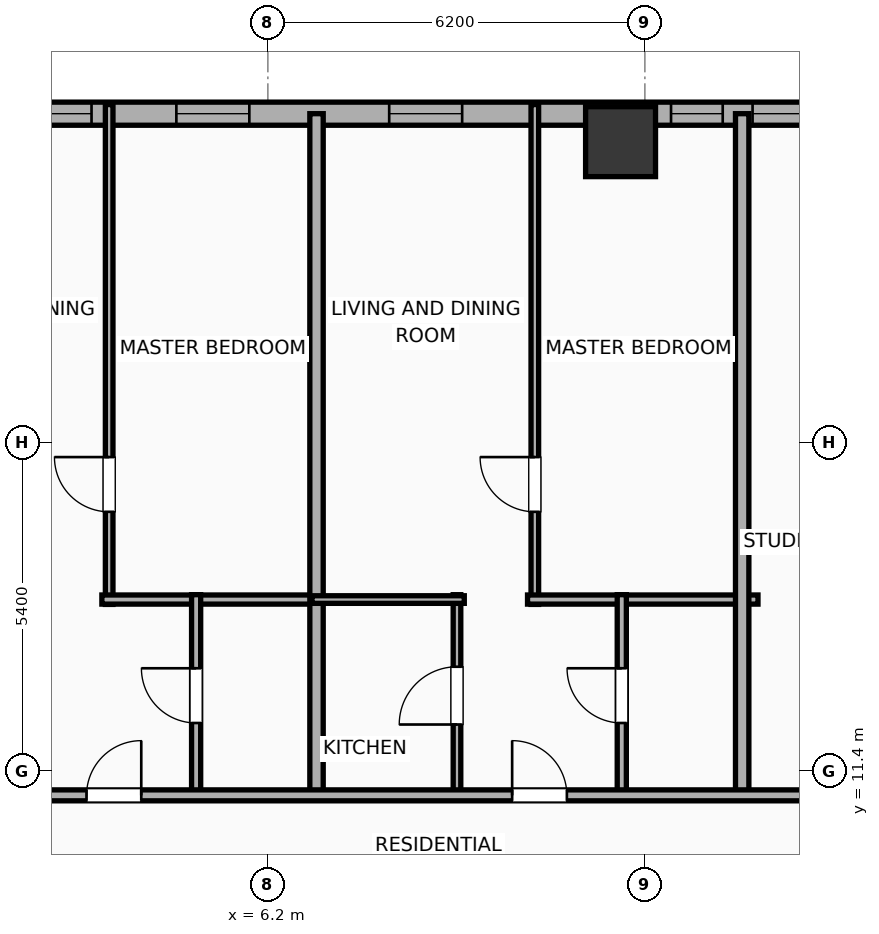
"""IFC4 building model, lengths in metres.
Left out: names, types, materials, properties, quantities, classifications, styles, units other than length and angle.
Written with IfcOpenShell. Run it as: python <this file> out.ifc"""

import sys

from ifc_helpers import new_model, si_unit, direction, frame, frame_2d, origin, origin_2d, place, context, subcontext, project, spatial, rectangle, hollow_rectangle, extrude, element, fill, save


model = new_model("IFC4")
c1 = context("Model", 3, precision=1e-05, world=origin(), true_north=direction((0.0, 1.0)))
c2 = subcontext(c1, "Body", "Model", "MODEL_VIEW")
j1 = project(units=[si_unit("LENGTHUNIT", "METRE"), si_unit("PLANEANGLEUNIT", "RADIAN")], contexts=[c1])
p1 = place(None, origin())
s1 = spatial("IfcSite", under=j1, at=p1, CompositionType="ELEMENT")
p2 = place(p1, origin())
s2 = spatial("IfcBuilding", under=s1, at=p2, CompositionType="ELEMENT")
p3 = place(p2, frame((0.0, 0.0, 65.0)))
s3 = spatial("IfcBuildingStorey", under=s2, at=p3, CompositionType="ELEMENT", Elevation=65.0)
p4 = place(p3, frame((12.0, 21.75, 0.0), z_axis=(0.0, 0.0, 1.0), x_axis=(1.0, 0.0, 0.0)))
e1 = element("IfcColumn", 1, at=p4, inside=s3, PredefinedType="COLUMN", context=c2, shape_type="SweptSolid", body=[
    extrude(hollow_rectangle(XDim=1.15, YDim=1.15, WallThickness=0.04, at=origin_2d()), origin(), (0.0, 0.0, 1.0), 3.9),
])
p5 = place(p3, frame((-29.581, 22.21, 0.0), z_axis=(0.0, 0.0, 1.0), x_axis=(1.0, 0.0, 0.0)))
e2 = element("IfcWall", 2, at=p5, inside=s3, PredefinedType="ELEMENTEDWALL", context=c2, shape_type="SweptSolid", body=[
    extrude(rectangle(XDim=51.963, YDim=0.38, at=frame_2d((25.981, 0.0))), origin(), (0.0, 0.0, 1.0), 3.65),
])
p6 = place(p5, frame((5.81, 0.0, 0.75)))
e3 = element("IfcOpeningElement", 3, at=p6, cuts=e2, PredefinedType="OPENING", context=c2, shape_type="SweptSolid", body=[
    extrude(rectangle(XDim=2.4, YDim=2.1, at=frame_2d((1.2, 1.05))), frame((0.0, 0.2, 0.0), z_axis=(0.0, -1.0, 0.0), x_axis=(1.0, 0.0, 0.0)), (0.0, 0.0, 1.0), 0.4),
])
p7 = place(p5, frame((26.431, 0.0, 0.75)))
e4 = element("IfcOpeningElement", 4, at=p7, cuts=e2, PredefinedType="OPENING", context=c2, shape_type="SweptSolid", body=[
    extrude(rectangle(XDim=2.4, YDim=2.1, at=frame_2d((1.2, 1.05))), frame((0.0, 0.2, 0.0), z_axis=(0.0, -1.0, 0.0), x_axis=(1.0, 0.0, 0.0)), (0.0, 0.0, 1.0), 0.4),
])
p8 = place(p5, frame((43.752, 0.0, 0.75)))
e5 = element("IfcOpeningElement", 5, at=p8, cuts=e2, PredefinedType="OPENING", context=c2, shape_type="SweptSolid", body=[
    extrude(rectangle(XDim=2.4, YDim=2.1, at=frame_2d((1.2, 1.05))), frame((0.0, 0.2, 0.0), z_axis=(0.0, -1.0, 0.0), x_axis=(1.0, 0.0, 0.0)), (0.0, 0.0, 1.0), 0.4),
])
p9 = place(p5, frame((1.163, 0.0, 0.75)))
e6 = element("IfcOpeningElement", 6, at=p9, cuts=e2, PredefinedType="OPENING", context=c2, shape_type="SweptSolid", body=[
    extrude(rectangle(XDim=1.2, YDim=2.05, at=frame_2d((0.6, 1.025))), frame((0.0, 0.2, 0.0), z_axis=(0.0, -1.0, 0.0), x_axis=(1.0, 0.0, 0.0)), (0.0, 0.0, 1.0), 0.4),
])
p10 = place(p5, frame((3.251, 0.0, 0.75)))
e7 = element("IfcOpeningElement", 7, at=p10, cuts=e2, PredefinedType="OPENING", context=c2, shape_type="SweptSolid", body=[
    extrude(rectangle(XDim=1.2, YDim=2.05, at=frame_2d((0.6, 1.025))), frame((0.0, 0.2, 0.0), z_axis=(0.0, -1.0, 0.0), x_axis=(1.0, 0.0, 0.0)), (0.0, 0.0, 1.0), 0.4),
])
p11 = place(p5, frame((11.745, 0.0, 0.75)))
e8 = element("IfcOpeningElement", 8, at=p11, cuts=e2, PredefinedType="OPENING", context=c2, shape_type="SweptSolid", body=[
    extrude(rectangle(XDim=1.2, YDim=2.05, at=frame_2d((0.6, 1.025))), frame((0.0, 0.2, 0.0), z_axis=(0.0, -1.0, 0.0), x_axis=(1.0, 0.0, 0.0)), (0.0, 0.0, 1.0), 0.4),
])
p12 = place(p5, frame((16.776, 0.0, 0.75)))
e9 = element("IfcOpeningElement", 9, at=p12, cuts=e2, PredefinedType="OPENING", context=c2, shape_type="SweptSolid", body=[
    extrude(rectangle(XDim=1.2, YDim=2.05, at=frame_2d((0.6, 1.025))), frame((0.0, 0.2, 0.0), z_axis=(0.0, -1.0, 0.0), x_axis=(1.0, 0.0, 0.0)), (0.0, 0.0, 1.0), 0.4),
])
p13 = place(p5, frame((21.531, 0.0, 0.75)))
e10 = element("IfcOpeningElement", 10, at=p13, cuts=e2, PredefinedType="OPENING", context=c2, shape_type="SweptSolid", body=[
    extrude(rectangle(XDim=0.85, YDim=2.05, at=frame_2d((0.425, 1.025))), frame((0.0, 0.2, 0.0), z_axis=(0.0, -1.0, 0.0), x_axis=(1.0, 0.0, 0.0)), (0.0, 0.0, 1.0), 0.4),
])
p14 = place(p5, frame((23.776, 0.0, 0.75)))
e11 = element("IfcOpeningElement", 11, at=p14, cuts=e2, PredefinedType="OPENING", context=c2, shape_type="SweptSolid", body=[
    extrude(rectangle(XDim=1.2, YDim=2.05, at=frame_2d((0.6, 1.025))), frame((0.0, 0.2, 0.0), z_axis=(0.0, -1.0, 0.0), x_axis=(1.0, 0.0, 0.0)), (0.0, 0.0, 1.0), 0.4),
])
p15 = place(p5, frame((32.031, 0.0, 0.75)))
e12 = element("IfcOpeningElement", 12, at=p15, cuts=e2, PredefinedType="OPENING", context=c2, shape_type="SweptSolid", body=[
    extrude(rectangle(XDim=0.85, YDim=2.05, at=frame_2d((0.425, 1.025))), frame((0.0, 0.2, 0.0), z_axis=(0.0, -1.0, 0.0), x_axis=(1.0, 0.0, 0.0)), (0.0, 0.0, 1.0), 0.4),
])
p16 = place(p5, frame((34.276, 0.0, 0.75)))
e13 = element("IfcOpeningElement", 13, at=p16, cuts=e2, PredefinedType="OPENING", context=c2, shape_type="SweptSolid", body=[
    extrude(rectangle(XDim=1.2, YDim=2.05, at=frame_2d((0.6, 1.025))), frame((0.0, 0.2, 0.0), z_axis=(0.0, -1.0, 0.0), x_axis=(1.0, 0.0, 0.0)), (0.0, 0.0, 1.0), 0.4),
])
p17 = place(p5, frame((37.776, 0.0, 0.75)))
e14 = element("IfcOpeningElement", 14, at=p17, cuts=e2, PredefinedType="OPENING", context=c2, shape_type="SweptSolid", body=[
    extrude(rectangle(XDim=1.2, YDim=2.05, at=frame_2d((0.6, 1.025))), frame((0.0, 0.2, 0.0), z_axis=(0.0, -1.0, 0.0), x_axis=(1.0, 0.0, 0.0)), (0.0, 0.0, 1.0), 0.4),
])
p18 = place(p5, frame((42.411, 0.0, 0.75)))
e15 = element("IfcOpeningElement", 15, at=p18, cuts=e2, PredefinedType="OPENING", context=c2, shape_type="SweptSolid", body=[
    extrude(rectangle(XDim=0.85, YDim=2.05, at=frame_2d((0.425, 1.025))), frame((0.0, 0.2, 0.0), z_axis=(0.0, -1.0, 0.0), x_axis=(1.0, 0.0, 0.0)), (0.0, 0.0, 1.0), 0.4),
])
p19 = place(p5, frame((47.791, 0.0, 0.75)))
e16 = element("IfcOpeningElement", 16, at=p19, cuts=e2, PredefinedType="OPENING", context=c2, shape_type="SweptSolid", body=[
    extrude(rectangle(XDim=1.2, YDim=2.05, at=frame_2d((0.6, 1.025))), frame((0.0, 0.2, 0.0), z_axis=(0.0, -1.0, 0.0), x_axis=(1.0, 0.0, 0.0)), (0.0, 0.0, 1.0), 0.4),
])
p20 = place(p5, frame((49.901, 0.0, 0.75)))
e17 = element("IfcOpeningElement", 17, at=p20, cuts=e2, PredefinedType="OPENING", context=c2, shape_type="SweptSolid", body=[
    extrude(rectangle(XDim=1.2, YDim=2.05, at=frame_2d((0.6, 1.025))), frame((0.0, 0.2, 0.0), z_axis=(0.0, -1.0, 0.0), x_axis=(1.0, 0.0, 0.0)), (0.0, 0.0, 1.0), 0.4),
])
p21 = place(p3, frame((3.59, 14.14, 0.0), z_axis=(0.0, 0.0, 1.0), x_axis=(0.0, 1.0, 0.0)))
e18 = element("IfcWall", 18, at=p21, inside=s3, PredefinedType="PARTITIONING", context=c2, shape_type="SweptSolid", body=[
    extrude(rectangle(XDim=8.22, YDim=0.125, at=frame_2d((4.11, 0.0))), origin(), (0.0, 0.0, 1.0), 3.65),
])
p22 = place(p21, frame((1.523, 0.0, 0.0)))
e19 = element("IfcOpeningElement", 19, at=p22, cuts=e18, PredefinedType="OPENING", context=c2, shape_type="SweptSolid", body=[
    extrude(rectangle(XDim=0.9, YDim=2.05, at=frame_2d((0.45, 1.025))), frame((0.0, 0.073, 0.0), z_axis=(0.0, -1.0, 0.0), x_axis=(1.0, 0.0, 0.0)), (0.0, 0.0, 1.0), 0.145),
])
p23 = place(p3, frame((3.47, 14.22, 0.0), z_axis=(0.0, 0.0, 1.0), x_axis=(1.0, 0.0, 0.0)))
e20 = element("IfcWall", 20, at=p23, inside=s3, PredefinedType="PLUMBINGWALL", context=c2, shape_type="SweptSolid", body=[
    extrude(rectangle(XDim=3.605, YDim=0.15, at=frame_2d((1.802, 0.0))), origin(), (0.0, 0.0, 1.0), 3.65),
])
p24 = place(p3, frame((5.02, 10.98, 0.0), z_axis=(0.0, 0.0, 1.0), x_axis=(0.0, 1.0, 0.0)))
e21 = element("IfcWall", 21, at=p24, inside=s3, PredefinedType="PLUMBINGWALL", context=c2, shape_type="SweptSolid", body=[
    extrude(rectangle(XDim=3.32, YDim=0.15, at=frame_2d((1.66, 0.0))), origin(), (0.0, 0.0, 1.0), 3.65),
])
p25 = place(p24, frame((1.21, 0.0, 0.0)))
e22 = element("IfcOpeningElement", 22, at=p25, cuts=e21, PredefinedType="OPENING", context=c2, shape_type="SweptSolid", body=[
    extrude(rectangle(XDim=0.9, YDim=2.05, at=frame_2d((0.45, 1.025))), frame((0.0, 0.085, 0.0), z_axis=(0.0, -1.0, 0.0), x_axis=(1.0, 0.0, 0.0)), (0.0, 0.0, 1.0), 0.17),
])
p26 = place(p3, frame((7.0, 10.92, 0.0), z_axis=(0.0, 0.0, 1.0), x_axis=(0.0, 1.0, 0.0)))
e23 = element("IfcWall", 23, at=p26, inside=s3, PredefinedType="PARTITIONING", context=c2, shape_type="SweptSolid", body=[
    extrude(rectangle(XDim=11.29, YDim=0.22, at=frame_2d((5.645, 0.0))), origin(), (0.0, 0.0, 1.0), 3.65),
])
p27 = place(p3, frame((10.59, 14.14, 0.0), z_axis=(0.0, 0.0, 1.0), x_axis=(0.0, 1.0, 0.0)))
e24 = element("IfcWall", 24, at=p27, inside=s3, PredefinedType="PARTITIONING", context=c2, shape_type="SweptSolid", body=[
    extrude(rectangle(XDim=8.22, YDim=0.125, at=frame_2d((4.11, 0.0))), origin(), (0.0, 0.0, 1.0), 3.65),
])
p28 = place(p27, frame((1.523, 0.0, 0.0)))
e25 = element("IfcOpeningElement", 25, at=p28, cuts=e24, PredefinedType="OPENING", context=c2, shape_type="SweptSolid", body=[
    extrude(rectangle(XDim=0.9, YDim=2.05, at=frame_2d((0.45, 1.025))), frame((0.0, 0.073, 0.0), z_axis=(0.0, -1.0, 0.0), x_axis=(1.0, 0.0, 0.0)), (0.0, 0.0, 1.0), 0.145),
])
p29 = place(p3, frame((10.47, 14.22, 0.0), z_axis=(0.0, 0.0, 1.0), x_axis=(1.0, 0.0, 0.0)))
e26 = element("IfcWall", 26, at=p29, inside=s3, PredefinedType="PLUMBINGWALL", context=c2, shape_type="SweptSolid", body=[
    extrude(rectangle(XDim=3.79, YDim=0.15, at=frame_2d((1.895, 0.0))), origin(), (0.0, 0.0, 1.0), 3.65),
])
p30 = place(p3, frame((9.31, 10.98, 0.0), z_axis=(0.0, 0.0, 1.0), x_axis=(0.0, 1.0, 0.0)))
e27 = element("IfcWall", 27, at=p30, inside=s3, PredefinedType="PARTITIONING", context=c2, shape_type="SweptSolid", body=[
    extrude(rectangle(XDim=3.32, YDim=0.125, at=frame_2d((1.66, 0.0))), origin(), (0.0, 0.0, 1.0), 3.65),
])
p31 = place(p30, frame((1.185, 0.0, 0.0)))
e28 = element("IfcOpeningElement", 28, at=p31, cuts=e27, PredefinedType="OPENING", context=c2, shape_type="SweptSolid", body=[
    extrude(rectangle(XDim=0.95, YDim=2.05, at=frame_2d((0.475, 1.025))), frame((0.0, 0.073, 0.0), z_axis=(0.0, -1.0, 0.0), x_axis=(1.0, 0.0, 0.0)), (0.0, 0.0, 1.0), 0.145),
])
p32 = place(p3, frame((6.925, 14.22, 0.0), z_axis=(0.0, 0.0, 1.0), x_axis=(1.0, 0.0, 0.0)))
e29 = element("IfcWall", 29, at=p32, inside=s3, PredefinedType="PARTITIONING", context=c2, shape_type="SweptSolid", body=[
    extrude(rectangle(XDim=2.505, YDim=0.125, at=frame_2d((1.252, 0.0))), origin(), (0.0, 0.0, 1.0), 3.65),
])
p33 = place(p3, frame((12.02, 10.98, 0.0), z_axis=(0.0, 0.0, 1.0), x_axis=(0.0, 1.0, 0.0)))
e30 = element("IfcWall", 30, at=p33, inside=s3, PredefinedType="PLUMBINGWALL", context=c2, shape_type="SweptSolid", body=[
    extrude(rectangle(XDim=3.32, YDim=0.15, at=frame_2d((1.66, 0.0))), origin(), (0.0, 0.0, 1.0), 2.94),
])
p34 = place(p33, frame((1.21, 0.0, 0.0)))
e31 = element("IfcOpeningElement", 31, at=p34, cuts=e30, PredefinedType="OPENING", context=c2, shape_type="SweptSolid", body=[
    extrude(rectangle(XDim=0.9, YDim=2.05, at=frame_2d((0.45, 1.025))), frame((0.0, 0.085, 0.0), z_axis=(0.0, -1.0, 0.0), x_axis=(1.0, 0.0, 0.0)), (0.0, 0.0, 1.0), 0.17),
])
p35 = place(p3, frame((14.0, 10.92, 0.0), z_axis=(0.0, 0.0, 1.0), x_axis=(0.0, 1.0, 0.0)))
e32 = element("IfcWall", 32, at=p35, inside=s3, PredefinedType="PARTITIONING", context=c2, shape_type="SweptSolid", body=[
    extrude(rectangle(XDim=11.29, YDim=0.22, at=frame_2d((5.645, 0.0))), origin(), (0.0, 0.0, 1.0), 3.65),
])
p36 = place(p3, frame((-33.41, 11.0, 0.0), z_axis=(0.0, 0.0, 1.0), x_axis=(1.0, 0.0, 0.0)))
e33 = element("IfcWall", 33, at=p36, inside=s3, PredefinedType="PARTITIONING", context=c2, shape_type="SweptSolid", body=[
    extrude(rectangle(XDim=59.62, YDim=0.18, at=frame_2d((29.81, 0.0))), origin(), (0.0, 0.0, 1.0), 3.65),
])
p37 = place(p36, frame((2.913, 0.0, 0.0)))
e34 = element("IfcOpeningElement", 34, at=p37, cuts=e33, PredefinedType="OPENING", context=c2, shape_type="SweptSolid", body=[
    extrude(rectangle(XDim=0.9, YDim=2.05, at=frame_2d((0.45, 1.025))), frame((0.0, 0.1, 0.0), z_axis=(0.0, -1.0, 0.0), x_axis=(1.0, 0.0, 0.0)), (0.0, 0.0, 1.0), 0.2),
])
p38 = place(p36, frame((10.312, 0.0, 0.0)))
e35 = element("IfcOpeningElement", 35, at=p38, cuts=e33, PredefinedType="OPENING", context=c2, shape_type="SweptSolid", body=[
    extrude(rectangle(XDim=1.15, YDim=2.05, at=frame_2d((0.575, 1.025))), frame((0.0, 0.1, 0.0), z_axis=(0.0, -1.0, 0.0), x_axis=(1.0, 0.0, 0.0)), (0.0, 0.0, 1.0), 0.2),
])
p39 = place(p36, frame((15.85, 0.0, 0.0)))
e36 = element("IfcOpeningElement", 36, at=p39, cuts=e33, PredefinedType="OPENING", context=c2, shape_type="SweptSolid", body=[
    extrude(rectangle(XDim=0.9, YDim=2.05, at=frame_2d((0.45, 1.025))), frame((0.0, 0.1, 0.0), z_axis=(0.0, -1.0, 0.0), x_axis=(1.0, 0.0, 0.0)), (0.0, 0.0, 1.0), 0.2),
])
p40 = place(p36, frame((22.623, 0.0, 0.0)))
e37 = element("IfcOpeningElement", 37, at=p40, cuts=e33, PredefinedType="OPENING", context=c2, shape_type="SweptSolid", body=[
    extrude(rectangle(XDim=0.9, YDim=2.05, at=frame_2d((0.45, 1.025))), frame((0.0, 0.1, 0.0), z_axis=(0.0, -1.0, 0.0), x_axis=(1.0, 0.0, 0.0)), (0.0, 0.0, 1.0), 0.2),
])
p41 = place(p36, frame((29.622, 0.0, 0.0)))
e38 = element("IfcOpeningElement", 38, at=p41, cuts=e33, PredefinedType="OPENING", context=c2, shape_type="SweptSolid", body=[
    extrude(rectangle(XDim=0.9, YDim=2.05, at=frame_2d((0.45, 1.025))), frame((0.0, 0.1, 0.0), z_axis=(0.0, -1.0, 0.0), x_axis=(1.0, 0.0, 0.0)), (0.0, 0.0, 1.0), 0.2),
])
p42 = place(p36, frame((36.628, 0.0, 0.0)))
e39 = element("IfcOpeningElement", 39, at=p42, cuts=e33, PredefinedType="OPENING", context=c2, shape_type="SweptSolid", body=[
    extrude(rectangle(XDim=0.9, YDim=2.05, at=frame_2d((0.45, 1.025))), frame((0.0, 0.1, 0.0), z_axis=(0.0, -1.0, 0.0), x_axis=(1.0, 0.0, 0.0)), (0.0, 0.0, 1.0), 0.2),
])
p43 = place(p36, frame((43.627, 0.0, 0.0)))
e40 = element("IfcOpeningElement", 40, at=p43, cuts=e33, PredefinedType="OPENING", context=c2, shape_type="SweptSolid", body=[
    extrude(rectangle(XDim=0.9, YDim=2.05, at=frame_2d((0.45, 1.025))), frame((0.0, 0.1, 0.0), z_axis=(0.0, -1.0, 0.0), x_axis=(1.0, 0.0, 0.0)), (0.0, 0.0, 1.0), 0.2),
])
p44 = place(p36, frame((48.617, 0.0, 0.0)))
e41 = element("IfcOpeningElement", 41, at=p44, cuts=e33, PredefinedType="OPENING", context=c2, shape_type="SweptSolid", body=[
    extrude(rectangle(XDim=1.15, YDim=2.05, at=frame_2d((0.575, 1.025))), frame((0.0, 0.1, 0.0), z_axis=(0.0, -1.0, 0.0), x_axis=(1.0, 0.0, 0.0)), (0.0, 0.0, 1.0), 0.2),
])
p45 = place(p36, frame((56.272, 0.0, 0.0)))
e42 = element("IfcOpeningElement", 42, at=p45, cuts=e33, PredefinedType="OPENING", context=c2, shape_type="SweptSolid", body=[
    extrude(rectangle(XDim=0.9, YDim=2.05, at=frame_2d((0.45, 1.025))), frame((0.0, 0.1, 0.0), z_axis=(0.0, -1.0, 0.0), x_axis=(1.0, 0.0, 0.0)), (0.0, 0.0, 1.0), 0.2),
])
p46 = place(p8, origin())
e43 = element("IfcWindow", 43, at=p46, inside=s3, PartitioningType="SINGLE_PANEL", PredefinedType="WINDOW", context=c2, shape_type="SweptSolid", body=[
    extrude(rectangle(XDim=2.4, YDim=2.1, at=frame_2d((1.2, 1.05))), frame((0.0, 0.03, 0.0), z_axis=(0.0, -1.0, 0.0), x_axis=(1.0, 0.0, 0.0)), (0.0, 0.0, 1.0), 0.06),
])
fill(e5, e43)
p47 = place(p15, origin())
e44 = element("IfcWindow", 44, at=p47, inside=s3, PartitioningType="SINGLE_PANEL", PredefinedType="WINDOW", context=c2, shape_type="SweptSolid", body=[
    extrude(rectangle(XDim=0.85, YDim=2.05, at=frame_2d((0.425, 1.025))), frame((0.0, 0.03, 0.0), z_axis=(0.0, -1.0, 0.0), x_axis=(1.0, 0.0, 0.0)), (0.0, 0.0, 1.0), 0.06),
])
fill(e12, e44)
p48 = place(p16, origin())
e45 = element("IfcWindow", 45, at=p48, inside=s3, PartitioningType="SINGLE_PANEL", PredefinedType="WINDOW", context=c2, shape_type="SweptSolid", body=[
    extrude(rectangle(XDim=1.2, YDim=2.05, at=frame_2d((0.6, 1.025))), frame((0.0, 0.03, 0.0), z_axis=(0.0, -1.0, 0.0), x_axis=(1.0, 0.0, 0.0)), (0.0, 0.0, 1.0), 0.06),
])
fill(e13, e45)
p49 = place(p17, origin())
e46 = element("IfcWindow", 46, at=p49, inside=s3, PartitioningType="SINGLE_PANEL", PredefinedType="WINDOW", context=c2, shape_type="SweptSolid", body=[
    extrude(rectangle(XDim=1.2, YDim=2.05, at=frame_2d((0.6, 1.025))), frame((0.0, 0.03, 0.0), z_axis=(0.0, -1.0, 0.0), x_axis=(1.0, 0.0, 0.0)), (0.0, 0.0, 1.0), 0.06),
])
fill(e14, e46)
p50 = place(p18, origin())
e47 = element("IfcWindow", 47, at=p50, inside=s3, PartitioningType="SINGLE_PANEL", PredefinedType="WINDOW", context=c2, shape_type="SweptSolid", body=[
    extrude(rectangle(XDim=0.85, YDim=2.05, at=frame_2d((0.425, 1.025))), frame((0.0, 0.03, 0.0), z_axis=(0.0, -1.0, 0.0), x_axis=(1.0, 0.0, 0.0)), (0.0, 0.0, 1.0), 0.06),
])
fill(e15, e47)
p51 = place(p22, origin())
e48 = element("IfcDoor", 48, at=p51, inside=s3, OperationType="SINGLE_SWING_RIGHT", PredefinedType="DOOR", context=c2, shape_type="SweptSolid", body=[
    extrude(rectangle(XDim=0.9, YDim=2.05, at=frame_2d((0.45, 1.025))), frame((0.0, 0.025, 0.0), z_axis=(0.0, -1.0, 0.0), x_axis=(1.0, 0.0, 0.0)), (0.0, 0.0, 1.0), 0.05),
])
fill(e19, e48)
p52 = place(p25, origin())
e49 = element("IfcDoor", 49, at=p52, inside=s3, OperationType="SINGLE_SWING_RIGHT", PredefinedType="DOOR", context=c2, shape_type="SweptSolid", body=[
    extrude(rectangle(XDim=0.9, YDim=2.05, at=frame_2d((0.45, 1.025))), frame((0.0, 0.025, 0.0), z_axis=(0.0, -1.0, 0.0), x_axis=(1.0, 0.0, 0.0)), (0.0, 0.0, 1.0), 0.05),
])
fill(e22, e49)
p53 = place(p28, origin())
e50 = element("IfcDoor", 50, at=p53, inside=s3, OperationType="SINGLE_SWING_RIGHT", PredefinedType="DOOR", context=c2, shape_type="SweptSolid", body=[
    extrude(rectangle(XDim=0.9, YDim=2.05, at=frame_2d((0.45, 1.025))), frame((0.0, 0.025, 0.0), z_axis=(0.0, -1.0, 0.0), x_axis=(1.0, 0.0, 0.0)), (0.0, 0.0, 1.0), 0.05),
])
fill(e25, e50)
p54 = place(p31, origin())
e51 = element("IfcDoor", 51, at=p54, inside=s3, OperationType="SINGLE_SWING_LEFT", PredefinedType="DOOR", context=c2, shape_type="SweptSolid", body=[
    extrude(rectangle(XDim=0.95, YDim=2.05, at=frame_2d((0.475, 1.025))), frame((0.0, 0.025, 0.0), z_axis=(0.0, -1.0, 0.0), x_axis=(1.0, 0.0, 0.0)), (0.0, 0.0, 1.0), 0.05),
])
fill(e28, e51)
p55 = place(p34, origin())
e52 = element("IfcDoor", 52, at=p55, inside=s3, OperationType="SINGLE_SWING_RIGHT", PredefinedType="DOOR", context=c2, shape_type="SweptSolid", body=[
    extrude(rectangle(XDim=0.9, YDim=2.05, at=frame_2d((0.45, 1.025))), frame((0.0, 0.025, 0.0), z_axis=(0.0, -1.0, 0.0), x_axis=(1.0, 0.0, 0.0)), (0.0, 0.0, 1.0), 0.05),
])
fill(e31, e52)
p56 = place(p42, origin())
e53 = element("IfcDoor", 53, at=p56, inside=s3, OperationType="SINGLE_SWING_RIGHT", PredefinedType="DOOR", context=c2, shape_type="SweptSolid", body=[
    extrude(rectangle(XDim=0.9, YDim=2.05, at=frame_2d((0.45, 1.025))), frame((0.0, 0.025, 0.0), z_axis=(0.0, -1.0, 0.0), x_axis=(1.0, 0.0, 0.0)), (0.0, 0.0, 1.0), 0.05),
])
fill(e39, e53)
p57 = place(p43, origin())
e54 = element("IfcDoor", 54, at=p57, inside=s3, OperationType="SINGLE_SWING_LEFT", PredefinedType="DOOR", context=c2, shape_type="SweptSolid", body=[
    extrude(rectangle(XDim=0.9, YDim=2.05, at=frame_2d((0.45, 1.025))), frame((0.0, 0.025, 0.0), z_axis=(0.0, -1.0, 0.0), x_axis=(1.0, 0.0, 0.0)), (0.0, 0.0, 1.0), 0.05),
])
fill(e40, e54)
save(model, sys.argv[1])
